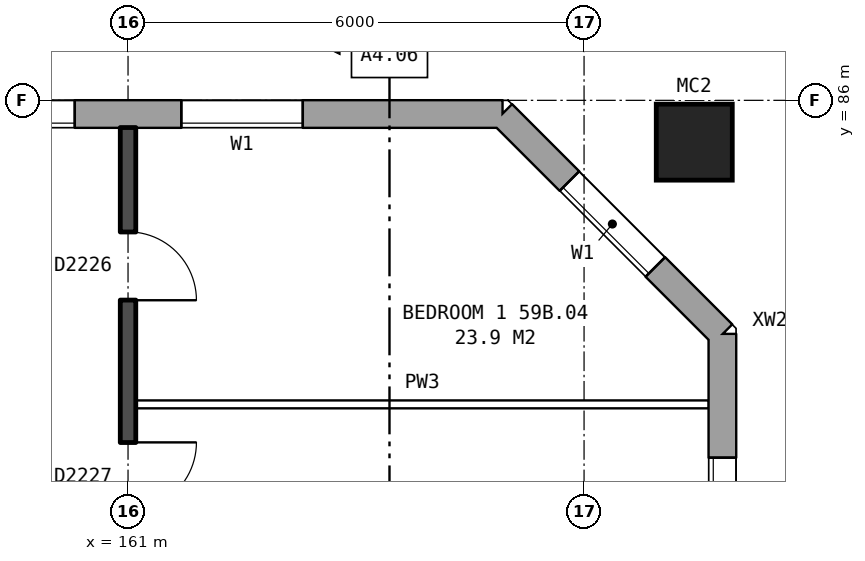
"""IFC4 building model, lengths in metres.
Left out: names, types, materials, properties, quantities, classifications, styles, units other than length and angle.
Written with IfcOpenShell. Run it as: python <this file> out.ifc"""

import sys

from ifc_helpers import new_model, si_unit, direction, frame, frame_2d, origin, origin_2d, place, context, subcontext, project, spatial, rectangle, hollow_rectangle, extrude, element, fill, save


model = new_model("IFC4")
c1 = context("Model", 3, precision=1e-05, world=origin(), true_north=direction((0.0, 1.0)))
c2 = subcontext(c1, "Body", "Model", "MODEL_VIEW")
j1 = project(units=[si_unit("LENGTHUNIT", "METRE"), si_unit("PLANEANGLEUNIT", "RADIAN")], contexts=[c1])
p1 = place(None, origin())
s1 = spatial("IfcSite", under=j1, at=p1, CompositionType="ELEMENT")
p2 = place(p1, origin())
s2 = spatial("IfcBuilding", under=s1, at=p2, CompositionType="ELEMENT")
p3 = place(p2, frame((0.0, 0.0, 209.0)))
s3 = spatial("IfcBuildingStorey", under=s2, at=p3, CompositionType="ELEMENT", Elevation=209.0)
p4 = place(p3, frame((168.45, 85.45, 0.0), z_axis=(0.0, 0.0, 1.0), x_axis=(1.0, 0.0, 0.0)))
e1 = element("IfcColumn", 1, at=p4, inside=s3, PredefinedType="COLUMN", context=c2, shape_type="SweptSolid", body=[
    extrude(hollow_rectangle(XDim=1.0, YDim=1.0, WallThickness=0.055, at=origin_2d()), origin(), (0.0, 0.0, 1.0), 3.1),
])
p5 = place(p3, frame((168.82, 57.075, 0.0), z_axis=(0.0, 0.0, 1.0), x_axis=(0.0, 1.0, 0.0)))
e2 = element("IfcWall", 2, at=p5, inside=s3, PredefinedType="STANDARD", context=c2, shape_type="SweptSolid", body=[
    extrude(rectangle(XDim=25.851, YDim=0.36, at=frame_2d((12.925, 0.0))), origin(), (0.0, 0.0, 1.0), 2.85),
])
p6 = place(p5, frame((1.625, 0.0, 0.8)))
e3 = element("IfcOpeningElement", 3, at=p6, cuts=e2, PredefinedType="OPENING", context=c2, shape_type="SweptSolid", body=[
    extrude(rectangle(XDim=1.6, YDim=1.8, at=frame_2d((0.8, 0.9))), frame((0.0, 0.19, 0.0), z_axis=(0.0, -1.0, 0.0), x_axis=(1.0, 0.0, 0.0)), (0.0, 0.0, 1.0), 0.38),
])
p7 = place(p5, frame((4.475, 0.0, 0.15)))
e4 = element("IfcOpeningElement", 4, at=p7, cuts=e2, PredefinedType="OPENING", context=c2, shape_type="SweptSolid", body=[
    extrude(rectangle(XDim=0.6, YDim=0.9, at=frame_2d((0.3, 0.45))), frame((0.0, 0.19, 0.0), z_axis=(0.0, -1.0, 0.0), x_axis=(1.0, 0.0, 0.0)), (0.0, 0.0, 1.0), 0.38),
])
p8 = place(p5, frame((19.425, 0.0, 0.25)))
e5 = element("IfcOpeningElement", 5, at=p8, cuts=e2, PredefinedType="OPENING", context=c2, shape_type="SweptSolid", body=[
    extrude(rectangle(XDim=1.0, YDim=1.8, at=frame_2d((0.5, 0.9))), frame((0.0, 0.19, 0.0), z_axis=(0.0, -1.0, 0.0), x_axis=(1.0, 0.0, 0.0)), (0.0, 0.0, 1.0), 0.38),
])
p9 = place(p5, frame((22.625, 0.0, 0.8)))
e6 = element("IfcOpeningElement", 6, at=p9, cuts=e2, PredefinedType="OPENING", context=c2, shape_type="SweptSolid", body=[
    extrude(rectangle(XDim=1.6, YDim=1.8, at=frame_2d((0.8, 0.9))), frame((0.0, 0.19, 0.0), z_axis=(0.0, -1.0, 0.0), x_axis=(1.0, 0.0, 0.0)), (0.0, 0.0, 1.0), 0.38),
])
p10 = place(p5, frame((5.375, 0.0, 0.15)))
e7 = element("IfcOpeningElement", 7, at=p10, cuts=e2, PredefinedType="OPENING", context=c2, shape_type="SweptSolid", body=[
    extrude(rectangle(XDim=1.0, YDim=1.8, at=frame_2d((0.5, 0.9))), frame((0.0, 0.19, 0.0), z_axis=(0.0, -1.0, 0.0), x_axis=(1.0, 0.0, 0.0)), (0.0, 0.0, 1.0), 0.38),
])
p11 = place(p5, frame((20.725, 0.0, 0.15)))
e8 = element("IfcOpeningElement", 8, at=p11, cuts=e2, PredefinedType="OPENING", context=c2, shape_type="SweptSolid", body=[
    extrude(rectangle(XDim=0.6, YDim=0.9, at=frame_2d((0.3, 0.45))), frame((0.0, 0.19, 0.0), z_axis=(0.0, -1.0, 0.0), x_axis=(1.0, 0.0, 0.0)), (0.0, 0.0, 1.0), 0.38),
])
p12 = place(p3, frame((168.82, 82.925, 0.0), z_axis=(0.0, 0.0, 1.0), x_axis=(-0.707106781187, 0.707106781187, 0.0)))
e9 = element("IfcWall", 9, at=p12, inside=s3, PredefinedType="STANDARD", context=c2, shape_type="SweptSolid", body=[
    extrude(rectangle(XDim=4.094, YDim=0.36, at=frame_2d((2.047, 0.0))), origin(), (0.0, 0.0, 1.0), 2.85),
])
p13 = place(p12, frame((1.247, 0.0, 0.8)))
e10 = element("IfcOpeningElement", 10, at=p13, cuts=e9, PredefinedType="OPENING", context=c2, shape_type="SweptSolid", body=[
    extrude(rectangle(XDim=1.6, YDim=1.8, at=frame_2d((0.8, 0.9))), frame((0.0, 0.19, 0.0), z_axis=(0.0, -1.0, 0.0), x_axis=(1.0, 0.0, 0.0)), (0.0, 0.0, 1.0), 0.38),
])
p14 = place(p3, frame((165.925, 85.82, 0.0), z_axis=(0.0, 0.0, 1.0), x_axis=(-1.0, 0.0, 0.0)))
e11 = element("IfcWall", 11, at=p14, inside=s3, PredefinedType="STANDARD", context=c2, shape_type="SweptSolid", body=[
    extrude(rectangle(XDim=33.875, YDim=0.36, at=frame_2d((16.938, 0.0))), origin(), (0.0, 0.0, 1.0), 2.85),
])
p15 = place(p14, frame((2.625, 0.0, 0.8)))
e12 = element("IfcOpeningElement", 12, at=p15, cuts=e11, PredefinedType="OPENING", context=c2, shape_type="SweptSolid", body=[
    extrude(rectangle(XDim=1.6, YDim=1.8, at=frame_2d((0.8, 0.9))), frame((0.0, 0.19, 0.0), z_axis=(0.0, -1.0, 0.0), x_axis=(1.0, 0.0, 0.0)), (0.0, 0.0, 1.0), 0.38),
])
p16 = place(p14, frame((5.625, 0.0, 0.8)))
e13 = element("IfcOpeningElement", 13, at=p16, cuts=e11, PredefinedType="OPENING", context=c2, shape_type="SweptSolid", body=[
    extrude(rectangle(XDim=1.6, YDim=1.8, at=frame_2d((0.8, 0.9))), frame((0.0, 0.19, 0.0), z_axis=(0.0, -1.0, 0.0), x_axis=(1.0, 0.0, 0.0)), (0.0, 0.0, 1.0), 0.38),
])
p17 = place(p14, frame((8.625, 0.0, 0.8)))
e14 = element("IfcOpeningElement", 14, at=p17, cuts=e11, PredefinedType="OPENING", context=c2, shape_type="SweptSolid", body=[
    extrude(rectangle(XDim=1.6, YDim=1.8, at=frame_2d((0.8, 0.9))), frame((0.0, 0.19, 0.0), z_axis=(0.0, -1.0, 0.0), x_axis=(1.0, 0.0, 0.0)), (0.0, 0.0, 1.0), 0.38),
])
p18 = place(p14, frame((11.625, 0.0, 0.8)))
e15 = element("IfcOpeningElement", 15, at=p18, cuts=e11, PredefinedType="OPENING", context=c2, shape_type="SweptSolid", body=[
    extrude(rectangle(XDim=1.6, YDim=1.8, at=frame_2d((0.8, 0.9))), frame((0.0, 0.19, 0.0), z_axis=(0.0, -1.0, 0.0), x_axis=(1.0, 0.0, 0.0)), (0.0, 0.0, 1.0), 0.38),
])
p19 = place(p14, frame((14.625, 0.0, 0.8)))
e16 = element("IfcOpeningElement", 16, at=p19, cuts=e11, PredefinedType="OPENING", context=c2, shape_type="SweptSolid", body=[
    extrude(rectangle(XDim=1.6, YDim=1.8, at=frame_2d((0.8, 0.9))), frame((0.0, 0.19, 0.0), z_axis=(0.0, -1.0, 0.0), x_axis=(1.0, 0.0, 0.0)), (0.0, 0.0, 1.0), 0.38),
])
p20 = place(p14, frame((17.625, 0.0, 0.8)))
e17 = element("IfcOpeningElement", 17, at=p20, cuts=e11, PredefinedType="OPENING", context=c2, shape_type="SweptSolid", body=[
    extrude(rectangle(XDim=1.6, YDim=1.8, at=frame_2d((0.8, 0.9))), frame((0.0, 0.19, 0.0), z_axis=(0.0, -1.0, 0.0), x_axis=(1.0, 0.0, 0.0)), (0.0, 0.0, 1.0), 0.38),
])
p21 = place(p14, frame((20.625, 0.0, 0.8)))
e18 = element("IfcOpeningElement", 18, at=p21, cuts=e11, PredefinedType="OPENING", context=c2, shape_type="SweptSolid", body=[
    extrude(rectangle(XDim=1.6, YDim=1.8, at=frame_2d((0.8, 0.9))), frame((0.0, 0.19, 0.0), z_axis=(0.0, -1.0, 0.0), x_axis=(1.0, 0.0, 0.0)), (0.0, 0.0, 1.0), 0.38),
])
p22 = place(p14, frame((23.625, 0.0, 0.8)))
e19 = element("IfcOpeningElement", 19, at=p22, cuts=e11, PredefinedType="OPENING", context=c2, shape_type="SweptSolid", body=[
    extrude(rectangle(XDim=1.6, YDim=1.8, at=frame_2d((0.8, 0.9))), frame((0.0, 0.19, 0.0), z_axis=(0.0, -1.0, 0.0), x_axis=(1.0, 0.0, 0.0)), (0.0, 0.0, 1.0), 0.38),
])
p23 = place(p14, frame((26.625, 0.0, 0.8)))
e20 = element("IfcOpeningElement", 20, at=p23, cuts=e11, PredefinedType="OPENING", context=c2, shape_type="SweptSolid", body=[
    extrude(rectangle(XDim=1.6, YDim=1.8, at=frame_2d((0.8, 0.9))), frame((0.0, 0.19, 0.0), z_axis=(0.0, -1.0, 0.0), x_axis=(1.0, 0.0, 0.0)), (0.0, 0.0, 1.0), 0.38),
])
p24 = place(p14, frame((30.925, 0.0, 1.1)))
e21 = element("IfcOpeningElement", 21, at=p24, cuts=e11, PredefinedType="OPENING", context=c2, shape_type="SweptSolid", body=[
    extrude(rectangle(XDim=0.8, YDim=1.5, at=frame_2d((0.4, 0.75))), frame((0.0, 0.19, 0.0), z_axis=(0.0, -1.0, 0.0), x_axis=(1.0, 0.0, 0.0)), (0.0, 0.0, 1.0), 0.38),
])
p25 = place(p14, frame((32.025, 0.0, 0.8)))
e22 = element("IfcOpeningElement", 22, at=p25, cuts=e11, PredefinedType="OPENING", context=c2, shape_type="SweptSolid", body=[
    extrude(rectangle(XDim=1.4, YDim=1.8, at=frame_2d((0.7, 0.9))), frame((0.0, 0.19, 0.0), z_axis=(0.0, -1.0, 0.0), x_axis=(1.0, 0.0, 0.0)), (0.0, 0.0, 1.0), 0.38),
])
p26 = place(p3, frame((161.1, 82.0, 0.0), z_axis=(0.0, 0.0, 1.0), x_axis=(1.0, 0.0, 0.0)))
e23 = element("IfcWall", 23, at=p26, inside=s3, PredefinedType="PARTITIONING", context=c2, shape_type="SweptSolid", body=[
    extrude(rectangle(XDim=7.54, YDim=0.1, at=frame_2d((3.77, 0.0))), origin(), (0.0, 0.0, 1.0), 2.85),
])
p27 = place(p3, frame((161.0, 76.2, 0.0), z_axis=(0.0, 0.0, 1.0), x_axis=(0.0, 1.0, 0.0)))
e24 = element("IfcWall", 24, at=p27, inside=s3, PredefinedType="SOLIDWALL", context=c2, shape_type="SweptSolid", body=[
    extrude(rectangle(XDim=9.44, YDim=0.2, at=frame_2d((4.72, 0.0))), origin(), (0.0, 0.0, 1.0), 2.85),
])
p28 = place(p27, frame((7.17, 0.0, 0.0)))
e25 = element("IfcOpeningElement", 25, at=p28, cuts=e24, PredefinedType="OPENING", context=c2, shape_type="SweptSolid", body=[
    extrude(rectangle(XDim=0.9, YDim=2.1, at=frame_2d((0.45, 1.05))), frame((0.0, 0.11, 0.0), z_axis=(0.0, -1.0, 0.0), x_axis=(1.0, 0.0, 0.0)), (0.0, 0.0, 1.0), 0.22),
])
p29 = place(p27, frame((4.4, 0.0, 0.0)))
e26 = element("IfcOpeningElement", 26, at=p29, cuts=e24, PredefinedType="OPENING", context=c2, shape_type="SweptSolid", body=[
    extrude(rectangle(XDim=0.9, YDim=2.1, at=frame_2d((0.45, 1.05))), frame((0.0, 0.11, 0.0), z_axis=(0.0, -1.0, 0.0), x_axis=(1.0, 0.0, 0.0)), (0.0, 0.0, 1.0), 0.22),
])
p30 = place(p27, frame((0.95, 0.0, 0.0)))
e27 = element("IfcOpeningElement", 27, at=p30, cuts=e24, PredefinedType="OPENING", context=c2, shape_type="SweptSolid", body=[
    extrude(rectangle(XDim=0.9, YDim=2.1, at=frame_2d((0.45, 1.05))), frame((0.0, 0.11, 0.0), z_axis=(0.0, -1.0, 0.0), x_axis=(1.0, 0.0, 0.0)), (0.0, 0.0, 1.0), 0.22),
])
p31 = place(p9, origin())
e28 = element("IfcWindow", 28, at=p31, inside=s3, PartitioningType="SINGLE_PANEL", PredefinedType="WINDOW", context=c2, shape_type="SweptSolid", body=[
    extrude(rectangle(XDim=1.6, YDim=1.8, at=frame_2d((0.8, 0.9))), frame((0.0, 0.15, 0.0), z_axis=(0.0, -1.0, 0.0), x_axis=(1.0, 0.0, 0.0)), (0.0, 0.0, 1.0), 0.06),
])
fill(e6, e28)
p32 = place(p13, origin())
e29 = element("IfcWindow", 29, at=p32, inside=s3, PartitioningType="SINGLE_PANEL", PredefinedType="WINDOW", context=c2, shape_type="SweptSolid", body=[
    extrude(rectangle(XDim=1.6, YDim=1.8, at=frame_2d((0.8, 0.9))), frame((0.0, 0.15, 0.0), z_axis=(0.0, -1.0, 0.0), x_axis=(1.0, 0.0, 0.0)), (0.0, 0.0, 1.0), 0.06),
])
fill(e10, e29)
p33 = place(p15, origin())
e30 = element("IfcWindow", 30, at=p33, inside=s3, PartitioningType="SINGLE_PANEL", PredefinedType="WINDOW", context=c2, shape_type="SweptSolid", body=[
    extrude(rectangle(XDim=1.6, YDim=1.8, at=frame_2d((0.8, 0.9))), frame((0.0, 0.15, 0.0), z_axis=(0.0, -1.0, 0.0), x_axis=(1.0, 0.0, 0.0)), (0.0, 0.0, 1.0), 0.06),
])
fill(e12, e30)
p34 = place(p16, origin())
e31 = element("IfcWindow", 31, at=p34, inside=s3, PartitioningType="SINGLE_PANEL", PredefinedType="WINDOW", context=c2, shape_type="SweptSolid", body=[
    extrude(rectangle(XDim=1.6, YDim=1.8, at=frame_2d((0.8, 0.9))), frame((0.0, 0.15, 0.0), z_axis=(0.0, -1.0, 0.0), x_axis=(1.0, 0.0, 0.0)), (0.0, 0.0, 1.0), 0.06),
])
fill(e13, e31)
p35 = place(p28, frame((0.9, 0.0, 0.0), z_axis=(0.0, 0.0, 1.0), x_axis=(-1.0, 0.0, 0.0)))
e32 = element("IfcDoor", 32, at=p35, inside=s3, OperationType="SINGLE_SWING_RIGHT", PredefinedType="DOOR", context=c2, shape_type="SweptSolid", body=[
    extrude(rectangle(XDim=0.9, YDim=2.1, at=frame_2d((0.45, 1.05))), frame((0.0, 0.025, 0.0), z_axis=(0.0, -1.0, 0.0), x_axis=(1.0, 0.0, 0.0)), (0.0, 0.0, 1.0), 0.05),
])
fill(e25, e32)
p36 = place(p29, frame((0.9, 0.0, 0.0), z_axis=(0.0, 0.0, 1.0), x_axis=(-1.0, 0.0, 0.0)))
e33 = element("IfcDoor", 33, at=p36, inside=s3, OperationType="SINGLE_SWING_LEFT", PredefinedType="DOOR", context=c2, shape_type="SweptSolid", body=[
    extrude(rectangle(XDim=0.9, YDim=2.1, at=frame_2d((0.45, 1.05))), frame((0.0, 0.025, 0.0), z_axis=(0.0, -1.0, 0.0), x_axis=(1.0, 0.0, 0.0)), (0.0, 0.0, 1.0), 0.05),
])
fill(e26, e33)
save(model, sys.argv[1])
